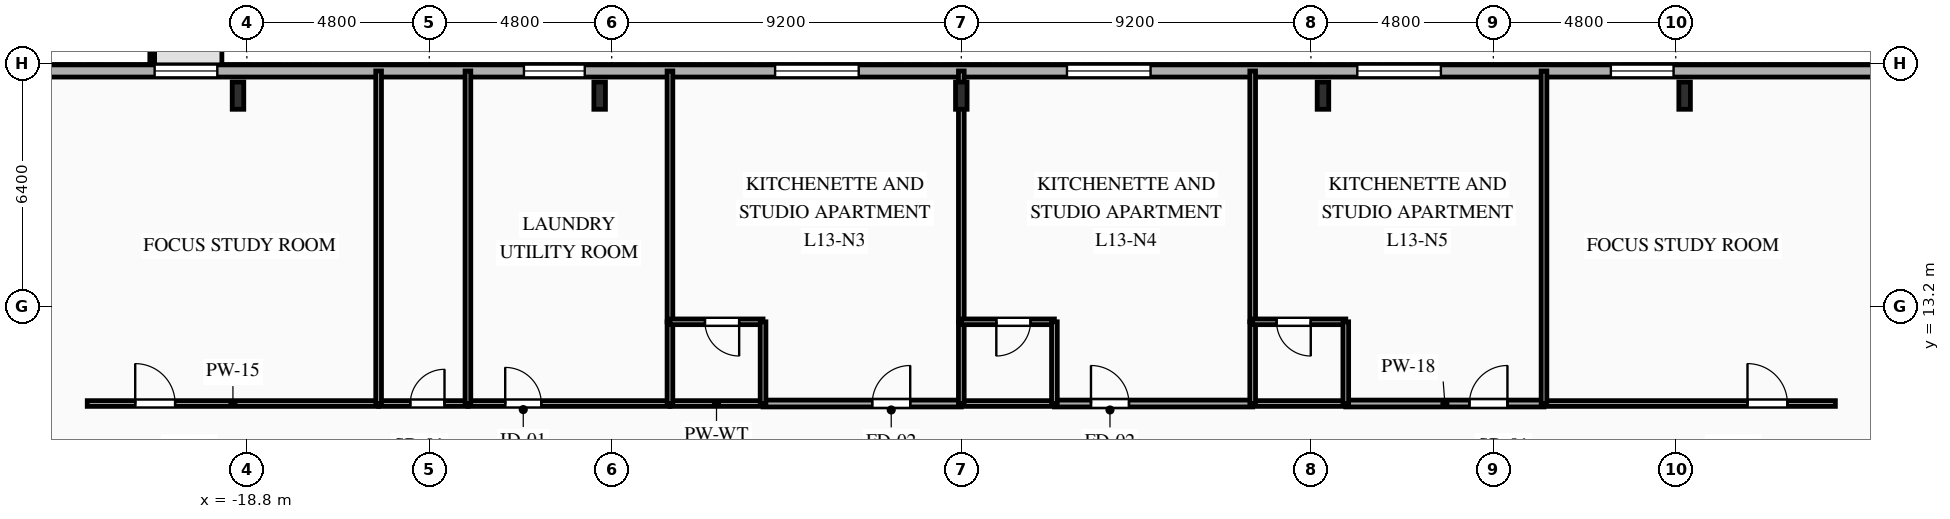
"""IFC4 building model, lengths in metres.
Left out: names, types, materials, properties, quantities, classifications, styles, units other than length and angle.
Written with IfcOpenShell. Run it as: python <this file> out.ifc"""

import sys

from ifc_helpers import new_model, si_unit, direction, frame, frame_2d, origin, origin_2d, place, context, subcontext, project, spatial, rectangle, i_section, extrude, element, fill, save


model = new_model("IFC4")
c1 = context("Model", 3, precision=1e-05, world=origin(), true_north=direction((0.0, 1.0)))
c2 = subcontext(c1, "Body", "Model", "MODEL_VIEW")
j1 = project(units=[si_unit("LENGTHUNIT", "METRE"), si_unit("PLANEANGLEUNIT", "RADIAN")], contexts=[c1])
p1 = place(None, origin())
s1 = spatial("IfcSite", under=j1, at=p1, CompositionType="ELEMENT")
p2 = place(p1, origin())
s2 = spatial("IfcBuilding", under=s1, at=p2, CompositionType="ELEMENT")
p3 = place(p2, frame((0.0, 0.0, 50.45)))
s3 = spatial("IfcBuildingStorey", under=s2, at=p3, CompositionType="ELEMENT", Elevation=50.45)
for number, where, z_axis, x_axis in (
    (1, (19.033, 18.75, 0.0), (0.0, 0.0, 1.0), (1.0, 0.0, 0.0)),
    (2, (9.517, 18.75, 0.0), (0.0, 0.0, 1.0), (1.0, 0.0, 0.0)),
    (3, (0.0, 18.75, 0.0), (0.0, 0.0, 1.0), (1.0, 0.0, 0.0)),
    (4, (-9.517, 18.75, 0.0), (0.0, 0.0, 1.0), (1.0, 0.0, 0.0)),
    (5, (-19.033, 18.75, 0.0), (0.0, 0.0, 1.0), (1.0, 0.0, 0.0)),
):
    element("IfcColumn", number, at=place(p3, frame(where, z_axis=z_axis, x_axis=x_axis)), inside=s3, PredefinedType="COLUMN", context=c2, shape_type="SweptSolid", body=[
        extrude(i_section(OverallWidth=0.304, OverallDepth=0.716, WebThickness=0.021, FlangeThickness=0.04, FilletRadius=0.027, at=origin_2d()), origin(), (0.0, 0.0, 1.0), 3.35),
    ])
p4 = place(p3, frame((-29.2, 19.4, 0.0), z_axis=(0.0, 0.0, 1.0), x_axis=(1.0, 0.0, 0.0)))
e6 = element("IfcWall", 6, at=p4, inside=s3, PredefinedType="SOLIDWALL", context=c2, shape_type="SweptSolid", body=[
    extrude(rectangle(XDim=58.4, YDim=0.32, at=frame_2d((29.2, 0.0))), origin(), (0.0, 0.0, 1.0), 3.035),
])
p5 = place(p4, frame((7.972, 0.0, 0.85)))
e7 = element("IfcOpeningElement", 7, at=p5, cuts=e6, PredefinedType="OPENING", context=c2, shape_type="SweptSolid", body=[
    extrude(rectangle(XDim=1.65, YDim=1.85, at=frame_2d((0.825, 0.925))), frame((0.0, 0.17, 0.0), z_axis=(0.0, -1.0, 0.0), x_axis=(1.0, 0.0, 0.0)), (0.0, 0.0, 1.0), 0.34),
])
p6 = place(p4, frame((17.691, 0.0, 0.85)))
e8 = element("IfcOpeningElement", 8, at=p6, cuts=e6, PredefinedType="OPENING", context=c2, shape_type="SweptSolid", body=[
    extrude(rectangle(XDim=1.6, YDim=1.85, at=frame_2d((0.8, 0.925))), frame((0.0, 0.17, 0.0), z_axis=(0.0, -1.0, 0.0), x_axis=(1.0, 0.0, 0.0)), (0.0, 0.0, 1.0), 0.34),
])
p7 = place(p4, frame((24.3, 0.0, 0.85)))
e9 = element("IfcOpeningElement", 9, at=p7, cuts=e6, PredefinedType="OPENING", context=c2, shape_type="SweptSolid", body=[
    extrude(rectangle(XDim=2.2, YDim=1.85, at=frame_2d((1.1, 0.925))), frame((0.0, 0.17, 0.0), z_axis=(0.0, -1.0, 0.0), x_axis=(1.0, 0.0, 0.0)), (0.0, 0.0, 1.0), 0.34),
])
p8 = place(p4, frame((31.98, 0.0, 0.85)))
e10 = element("IfcOpeningElement", 10, at=p8, cuts=e6, PredefinedType="OPENING", context=c2, shape_type="SweptSolid", body=[
    extrude(rectangle(XDim=2.2, YDim=1.85, at=frame_2d((1.1, 0.925))), frame((0.0, 0.17, 0.0), z_axis=(0.0, -1.0, 0.0), x_axis=(1.0, 0.0, 0.0)), (0.0, 0.0, 1.0), 0.34),
])
p9 = place(p4, frame((39.62, 0.0, 0.85)))
e11 = element("IfcOpeningElement", 11, at=p9, cuts=e6, PredefinedType="OPENING", context=c2, shape_type="SweptSolid", body=[
    extrude(rectangle(XDim=2.2, YDim=1.85, at=frame_2d((1.1, 0.925))), frame((0.0, 0.17, 0.0), z_axis=(0.0, -1.0, 0.0), x_axis=(1.0, 0.0, 0.0)), (0.0, 0.0, 1.0), 0.34),
])
p10 = place(p4, frame((46.292, 0.0, 0.85)))
e12 = element("IfcOpeningElement", 12, at=p10, cuts=e6, PredefinedType="OPENING", context=c2, shape_type="SweptSolid", body=[
    extrude(rectangle(XDim=1.65, YDim=1.85, at=frame_2d((0.825, 0.925))), frame((0.0, 0.17, 0.0), z_axis=(0.0, -1.0, 0.0), x_axis=(1.0, 0.0, 0.0)), (0.0, 0.0, 1.0), 0.34),
])
p11 = place(p3, frame((-23.0, 10.65, 0.0), z_axis=(0.0, 0.0, 1.0), x_axis=(1.0, 0.0, 0.0)))
e13 = element("IfcWall", 13, at=p11, inside=s3, PredefinedType="PARTITIONING", context=c2, shape_type="SweptSolid", body=[
    extrude(rectangle(XDim=7.667, YDim=0.15, at=frame_2d((3.833, 0.0))), origin(), (0.0, 0.0, 1.0), 3.035),
])
p12 = place(p11, frame((1.262, 0.0, 0.0)))
e14 = element("IfcOpeningElement", 14, at=p12, cuts=e13, PredefinedType="OPENING", context=c2, shape_type="SweptSolid", body=[
    extrude(rectangle(XDim=1.05, YDim=2.15, at=frame_2d((0.525, 1.075))), frame((0.0, 0.085, 0.0), z_axis=(0.0, -1.0, 0.0), x_axis=(1.0, 0.0, 0.0)), (0.0, 0.0, 1.0), 0.17),
])
p13 = place(p3, frame((-15.333, 10.65, 0.0), z_axis=(0.0, 0.0, 1.0), x_axis=(1.0, 0.0, 0.0)))
e15 = element("IfcWall", 15, at=p13, inside=s3, PredefinedType="PLUMBINGWALL", context=c2, shape_type="SweptSolid", body=[
    extrude(rectangle(XDim=2.35, YDim=0.15, at=frame_2d((1.175, 0.0))), origin(), (0.0, 0.0, 1.0), 3.035),
])
p14 = place(p13, frame((0.834, 0.0, 0.0)))
e16 = element("IfcOpeningElement", 16, at=p14, cuts=e15, PredefinedType="OPENING", context=c2, shape_type="SweptSolid", body=[
    extrude(rectangle(XDim=0.9, YDim=2.1, at=frame_2d((0.45, 1.05))), frame((0.0, 0.085, 0.0), z_axis=(0.0, -1.0, 0.0), x_axis=(1.0, 0.0, 0.0)), (0.0, 0.0, 1.0), 0.17),
])
p15 = place(p3, frame((-12.983, 10.65, 0.0), z_axis=(0.0, 0.0, 1.0), x_axis=(1.0, 0.0, 0.0)))
e17 = element("IfcWall", 17, at=p15, inside=s3, PredefinedType="PARTITIONING", context=c2, shape_type="SweptSolid", body=[
    extrude(rectangle(XDim=5.316, YDim=0.15, at=frame_2d((2.658, 0.0))), origin(), (0.0, 0.0, 1.0), 3.035),
])
p16 = place(p15, frame((0.981, 0.0, 0.0)))
e18 = element("IfcOpeningElement", 18, at=p16, cuts=e17, PredefinedType="OPENING", context=c2, shape_type="SweptSolid", body=[
    extrude(rectangle(XDim=0.95, YDim=2.1, at=frame_2d((0.475, 1.05))), frame((0.0, 0.085, 0.0), z_axis=(0.0, -1.0, 0.0), x_axis=(1.0, 0.0, 0.0)), (0.0, 0.0, 1.0), 0.17),
])
p17 = place(p3, frame((-5.217, 10.65, 0.0), z_axis=(0.0, 0.0, 1.0), x_axis=(1.0, 0.0, 0.0)))
e19 = element("IfcWall", 19, at=p17, inside=s3, PredefinedType="PARTITIONING", context=c2, shape_type="SweptSolid", body=[
    extrude(rectangle(XDim=5.217, YDim=0.18, at=frame_2d((2.608, 0.0))), origin(), (0.0, 0.0, 1.0), 3.035),
])
p18 = place(p17, frame((2.873, 0.0, 0.0)))
e20 = element("IfcOpeningElement", 20, at=p18, cuts=e19, PredefinedType="OPENING", context=c2, shape_type="SweptSolid", body=[
    extrude(rectangle(XDim=1.0, YDim=2.15, at=frame_2d((0.5, 1.075))), frame((0.0, 0.1, 0.0), z_axis=(0.0, -1.0, 0.0), x_axis=(1.0, 0.0, 0.0)), (0.0, 0.0, 1.0), 0.2),
])
p19 = place(p3, frame((-7.667, 10.65, 0.0), z_axis=(0.0, 0.0, 1.0), x_axis=(1.0, 0.0, 0.0)))
e21 = element("IfcWall", 21, at=p19, inside=s3, PredefinedType="PLUMBINGWALL", context=c2, shape_type="SweptSolid", body=[
    extrude(rectangle(XDim=2.45, YDim=0.15, at=frame_2d((1.225, 0.0))), origin(), (0.0, 0.0, 1.0), 3.035),
])
p20 = place(p3, frame((2.45, 10.65, 0.0), z_axis=(0.0, 0.0, 1.0), x_axis=(1.0, 0.0, 0.0)))
e22 = element("IfcWall", 22, at=p20, inside=s3, PredefinedType="PARTITIONING", context=c2, shape_type="SweptSolid", body=[
    extrude(rectangle(XDim=5.217, YDim=0.18, at=frame_2d((2.608, 0.0))), origin(), (0.0, 0.0, 1.0), 3.035),
])
p21 = place(p20, frame((0.962, 0.0, 0.0)))
e23 = element("IfcOpeningElement", 23, at=p21, cuts=e22, PredefinedType="OPENING", context=c2, shape_type="SweptSolid", body=[
    extrude(rectangle(XDim=1.0, YDim=2.15, at=frame_2d((0.5, 1.075))), frame((0.0, 0.1, 0.0), z_axis=(0.0, -1.0, 0.0), x_axis=(1.0, 0.0, 0.0)), (0.0, 0.0, 1.0), 0.2),
])
p22 = place(p3, frame((0.0, 10.65, 0.0), z_axis=(0.0, 0.0, 1.0), x_axis=(1.0, 0.0, 0.0)))
e24 = element("IfcWall", 24, at=p22, inside=s3, PredefinedType="PLUMBINGWALL", context=c2, shape_type="SweptSolid", body=[
    extrude(rectangle(XDim=2.45, YDim=0.15, at=frame_2d((1.225, 0.0))), origin(), (0.0, 0.0, 1.0), 3.035),
])
p23 = place(p3, frame((10.117, 10.65, 0.0), z_axis=(0.0, 0.0, 1.0), x_axis=(1.0, 0.0, 0.0)))
e25 = element("IfcWall", 25, at=p23, inside=s3, PredefinedType="PARTITIONING", context=c2, shape_type="SweptSolid", body=[
    extrude(rectangle(XDim=5.216, YDim=0.18, at=frame_2d((2.608, 0.0))), origin(), (0.0, 0.0, 1.0), 3.035),
])
p24 = place(p23, frame((3.254, 0.0, 0.0)))
e26 = element("IfcOpeningElement", 26, at=p24, cuts=e25, PredefinedType="OPENING", context=c2, shape_type="SweptSolid", body=[
    extrude(rectangle(XDim=1.0, YDim=2.15, at=frame_2d((0.5, 1.075))), frame((0.0, 0.1, 0.0), z_axis=(0.0, -1.0, 0.0), x_axis=(1.0, 0.0, 0.0)), (0.0, 0.0, 1.0), 0.2),
])
p25 = place(p3, frame((7.667, 10.65, 0.0), z_axis=(0.0, 0.0, 1.0), x_axis=(1.0, 0.0, 0.0)))
e27 = element("IfcWall", 27, at=p25, inside=s3, PredefinedType="PLUMBINGWALL", context=c2, shape_type="SweptSolid", body=[
    extrude(rectangle(XDim=2.45, YDim=0.15, at=frame_2d((1.225, 0.0))), origin(), (0.0, 0.0, 1.0), 3.035),
])
p26 = place(p3, frame((15.333, 10.65, 0.0), z_axis=(0.0, 0.0, 1.0), x_axis=(1.0, 0.0, 0.0)))
e28 = element("IfcWall", 28, at=p26, inside=s3, PredefinedType="PARTITIONING", context=c2, shape_type="SweptSolid", body=[
    extrude(rectangle(XDim=7.667, YDim=0.15, at=frame_2d((3.833, 0.0))), origin(), (0.0, 0.0, 1.0), 3.035),
])
p27 = place(p26, frame((5.355, 0.0, 0.0)))
e29 = element("IfcOpeningElement", 29, at=p27, cuts=e28, PredefinedType="OPENING", context=c2, shape_type="SweptSolid", body=[
    extrude(rectangle(XDim=1.05, YDim=2.15, at=frame_2d((0.525, 1.075))), frame((0.0, 0.085, 0.0), z_axis=(0.0, -1.0, 0.0), x_axis=(1.0, 0.0, 0.0)), (0.0, 0.0, 1.0), 0.17),
])
for number, where, z_axis, x_axis in (
    (30, (-15.333, 19.4, 0.0), (0.0, 0.0, 1.0), (0.0, -1.0, 0.0)),
    (31, (-12.983, 19.4, 0.0), (0.0, 0.0, 1.0), (0.0, -1.0, 0.0)),
):
    element("IfcWall", number, at=place(p3, frame(where, z_axis=z_axis, x_axis=x_axis)), inside=s3, PredefinedType="PLUMBINGWALL", context=c2, shape_type="SweptSolid", body=[
        extrude(rectangle(XDim=8.75, YDim=0.15, at=frame_2d((4.375, 0.0))), origin(), (0.0, 0.0, 1.0), 3.035),
    ])
p28 = place(p3, frame((-7.667, 19.4, 0.0), z_axis=(0.0, 0.0, 1.0), x_axis=(0.0, -1.0, 0.0)))
e32 = element("IfcWall", 32, at=p28, inside=s3, PredefinedType="PARTITIONING", context=c2, shape_type="SweptSolid", body=[
    extrude(rectangle(XDim=6.6, YDim=0.15, at=frame_2d((3.3, 0.0))), origin(), (0.0, 0.0, 1.0), 3.035),
])
p29 = place(p3, frame((-7.667, 12.8, 0.0), z_axis=(0.0, 0.0, 1.0), x_axis=(0.0, -1.0, 0.0)))
e33 = element("IfcWall", 33, at=p29, inside=s3, PredefinedType="PLUMBINGWALL", context=c2, shape_type="SweptSolid", body=[
    extrude(rectangle(XDim=2.15, YDim=0.15, at=frame_2d((1.075, 0.0))), origin(), (0.0, 0.0, 1.0), 3.035),
])
p30 = place(p3, frame((-5.217, 12.8, 0.0), z_axis=(0.0, 0.0, 1.0), x_axis=(-1.0, 0.0, 0.0)))
e34 = element("IfcWall", 34, at=p30, inside=s3, PredefinedType="PLUMBINGWALL", context=c2, shape_type="SweptSolid", body=[
    extrude(rectangle(XDim=2.45, YDim=0.15, at=frame_2d((1.225, 0.0))), origin(), (0.0, 0.0, 1.0), 3.035),
])
p31 = place(p30, frame((0.629, 0.0, 0.0)))
e35 = element("IfcOpeningElement", 35, at=p31, cuts=e34, PredefinedType="OPENING", context=c2, shape_type="SweptSolid", body=[
    extrude(rectangle(XDim=0.9, YDim=2.1, at=frame_2d((0.45, 1.05))), frame((0.0, 0.085, 0.0), z_axis=(0.0, -1.0, 0.0), x_axis=(1.0, 0.0, 0.0)), (0.0, 0.0, 1.0), 0.17),
])
p32 = place(p3, frame((-5.217, 10.65, 0.0), z_axis=(0.0, 0.0, 1.0), x_axis=(0.0, 1.0, 0.0)))
e36 = element("IfcWall", 36, at=p32, inside=s3, PredefinedType="PLUMBINGWALL", context=c2, shape_type="SweptSolid", body=[
    extrude(rectangle(XDim=2.15, YDim=0.15, at=frame_2d((1.075, 0.0))), origin(), (0.0, 0.0, 1.0), 3.035),
])
p33 = place(p3, frame((0.0, 19.4, 0.0), z_axis=(0.0, 0.0, 1.0), x_axis=(0.0, -1.0, 0.0)))
e37 = element("IfcWall", 37, at=p33, inside=s3, PredefinedType="PARTITIONING", context=c2, shape_type="SweptSolid", body=[
    extrude(rectangle(XDim=6.6, YDim=0.15, at=frame_2d((3.3, 0.0))), origin(), (0.0, 0.0, 1.0), 3.035),
])
p34 = place(p3, frame((0.0, 12.8, 0.0), z_axis=(0.0, 0.0, 1.0), x_axis=(0.0, -1.0, 0.0)))
e38 = element("IfcWall", 38, at=p34, inside=s3, PredefinedType="PLUMBINGWALL", context=c2, shape_type="SweptSolid", body=[
    extrude(rectangle(XDim=2.15, YDim=0.15, at=frame_2d((1.075, 0.0))), origin(), (0.0, 0.0, 1.0), 3.035),
])
p35 = place(p3, frame((2.45, 12.8, 0.0), z_axis=(0.0, 0.0, 1.0), x_axis=(-1.0, 0.0, 0.0)))
e39 = element("IfcWall", 39, at=p35, inside=s3, PredefinedType="PLUMBINGWALL", context=c2, shape_type="SweptSolid", body=[
    extrude(rectangle(XDim=2.45, YDim=0.15, at=frame_2d((1.225, 0.0))), origin(), (0.0, 0.0, 1.0), 3.035),
])
p36 = place(p35, frame((0.629, 0.0, 0.0)))
e40 = element("IfcOpeningElement", 40, at=p36, cuts=e39, PredefinedType="OPENING", context=c2, shape_type="SweptSolid", body=[
    extrude(rectangle(XDim=0.9, YDim=2.1, at=frame_2d((0.45, 1.05))), frame((0.0, 0.085, 0.0), z_axis=(0.0, -1.0, 0.0), x_axis=(1.0, 0.0, 0.0)), (0.0, 0.0, 1.0), 0.17),
])
p37 = place(p3, frame((2.45, 10.65, 0.0), z_axis=(0.0, 0.0, 1.0), x_axis=(0.0, 1.0, 0.0)))
e41 = element("IfcWall", 41, at=p37, inside=s3, PredefinedType="PLUMBINGWALL", context=c2, shape_type="SweptSolid", body=[
    extrude(rectangle(XDim=2.15, YDim=0.15, at=frame_2d((1.075, 0.0))), origin(), (0.0, 0.0, 1.0), 3.035),
])
p38 = place(p3, frame((7.667, 19.4, 0.0), z_axis=(0.0, 0.0, 1.0), x_axis=(0.0, -1.0, 0.0)))
e42 = element("IfcWall", 42, at=p38, inside=s3, PredefinedType="PARTITIONING", context=c2, shape_type="SweptSolid", body=[
    extrude(rectangle(XDim=6.6, YDim=0.15, at=frame_2d((3.3, 0.0))), origin(), (0.0, 0.0, 1.0), 3.035),
])
p39 = place(p3, frame((7.667, 12.8, 0.0), z_axis=(0.0, 0.0, 1.0), x_axis=(0.0, -1.0, 0.0)))
e43 = element("IfcWall", 43, at=p39, inside=s3, PredefinedType="PLUMBINGWALL", context=c2, shape_type="SweptSolid", body=[
    extrude(rectangle(XDim=2.15, YDim=0.15, at=frame_2d((1.075, 0.0))), origin(), (0.0, 0.0, 1.0), 3.035),
])
p40 = place(p3, frame((10.117, 12.8, 0.0), z_axis=(0.0, 0.0, 1.0), x_axis=(-1.0, 0.0, 0.0)))
e44 = element("IfcWall", 44, at=p40, inside=s3, PredefinedType="PLUMBINGWALL", context=c2, shape_type="SweptSolid", body=[
    extrude(rectangle(XDim=2.45, YDim=0.15, at=frame_2d((1.225, 0.0))), origin(), (0.0, 0.0, 1.0), 3.035),
])
p41 = place(p40, frame((0.921, 0.0, 0.0)))
e45 = element("IfcOpeningElement", 45, at=p41, cuts=e44, PredefinedType="OPENING", context=c2, shape_type="SweptSolid", body=[
    extrude(rectangle(XDim=0.9, YDim=2.1, at=frame_2d((0.45, 1.05))), frame((0.0, 0.085, 0.0), z_axis=(0.0, -1.0, 0.0), x_axis=(1.0, 0.0, 0.0)), (0.0, 0.0, 1.0), 0.17),
])
p42 = place(p3, frame((10.117, 10.65, 0.0), z_axis=(0.0, 0.0, 1.0), x_axis=(0.0, 1.0, 0.0)))
e46 = element("IfcWall", 46, at=p42, inside=s3, PredefinedType="PLUMBINGWALL", context=c2, shape_type="SweptSolid", body=[
    extrude(rectangle(XDim=2.15, YDim=0.15, at=frame_2d((1.075, 0.0))), origin(), (0.0, 0.0, 1.0), 3.035),
])
p43 = place(p3, frame((15.333, 19.4, 0.0), z_axis=(0.0, 0.0, 1.0), x_axis=(0.0, -1.0, 0.0)))
e47 = element("IfcWall", 47, at=p43, inside=s3, PredefinedType="PARTITIONING", context=c2, shape_type="SweptSolid", body=[
    extrude(rectangle(XDim=8.75, YDim=0.15, at=frame_2d((4.375, 0.0))), origin(), (0.0, 0.0, 1.0), 3.035),
])
p44 = place(p5, origin())
e48 = element("IfcWindow", 48, at=p44, inside=s3, PartitioningType="SINGLE_PANEL", PredefinedType="WINDOW", context=c2, shape_type="SweptSolid", body=[
    extrude(rectangle(XDim=1.65, YDim=1.85, at=frame_2d((0.825, 0.925))), frame((0.0, 0.03, 0.0), z_axis=(0.0, -1.0, 0.0), x_axis=(1.0, 0.0, 0.0)), (0.0, 0.0, 1.0), 0.06),
])
fill(e7, e48)
p45 = place(p6, origin())
e49 = element("IfcWindow", 49, at=p45, inside=s3, PartitioningType="SINGLE_PANEL", PredefinedType="WINDOW", context=c2, shape_type="SweptSolid", body=[
    extrude(rectangle(XDim=1.6, YDim=1.85, at=frame_2d((0.8, 0.925))), frame((0.0, 0.03, 0.0), z_axis=(0.0, -1.0, 0.0), x_axis=(1.0, 0.0, 0.0)), (0.0, 0.0, 1.0), 0.06),
])
fill(e8, e49)
p46 = place(p7, origin())
e50 = element("IfcWindow", 50, at=p46, inside=s3, PartitioningType="SINGLE_PANEL", PredefinedType="WINDOW", context=c2, shape_type="SweptSolid", body=[
    extrude(rectangle(XDim=2.2, YDim=1.85, at=frame_2d((1.1, 0.925))), frame((0.0, 0.03, 0.0), z_axis=(0.0, -1.0, 0.0), x_axis=(1.0, 0.0, 0.0)), (0.0, 0.0, 1.0), 0.06),
])
fill(e9, e50)
p47 = place(p8, origin())
e51 = element("IfcWindow", 51, at=p47, inside=s3, PartitioningType="SINGLE_PANEL", PredefinedType="WINDOW", context=c2, shape_type="SweptSolid", body=[
    extrude(rectangle(XDim=2.2, YDim=1.85, at=frame_2d((1.1, 0.925))), frame((0.0, 0.03, 0.0), z_axis=(0.0, -1.0, 0.0), x_axis=(1.0, 0.0, 0.0)), (0.0, 0.0, 1.0), 0.06),
])
fill(e10, e51)
p48 = place(p9, origin())
e52 = element("IfcWindow", 52, at=p48, inside=s3, PartitioningType="SINGLE_PANEL", PredefinedType="WINDOW", context=c2, shape_type="SweptSolid", body=[
    extrude(rectangle(XDim=2.2, YDim=1.85, at=frame_2d((1.1, 0.925))), frame((0.0, 0.03, 0.0), z_axis=(0.0, -1.0, 0.0), x_axis=(1.0, 0.0, 0.0)), (0.0, 0.0, 1.0), 0.06),
])
fill(e11, e52)
p49 = place(p10, origin())
e53 = element("IfcWindow", 53, at=p49, inside=s3, PartitioningType="SINGLE_PANEL", PredefinedType="WINDOW", context=c2, shape_type="SweptSolid", body=[
    extrude(rectangle(XDim=1.65, YDim=1.85, at=frame_2d((0.825, 0.925))), frame((0.0, 0.03, 0.0), z_axis=(0.0, -1.0, 0.0), x_axis=(1.0, 0.0, 0.0)), (0.0, 0.0, 1.0), 0.06),
])
fill(e12, e53)
p50 = place(p12, origin())
e54 = element("IfcDoor", 54, at=p50, inside=s3, OperationType="SINGLE_SWING_LEFT", PredefinedType="DOOR", context=c2, shape_type="SweptSolid", body=[
    extrude(rectangle(XDim=1.05, YDim=2.15, at=frame_2d((0.525, 1.075))), frame((0.0, 0.025, 0.0), z_axis=(0.0, -1.0, 0.0), x_axis=(1.0, 0.0, 0.0)), (0.0, 0.0, 1.0), 0.05),
])
fill(e14, e54)
p51 = place(p14, origin())
e55 = element("IfcDoor", 55, at=p51, inside=s3, OperationType="SINGLE_SWING_RIGHT", PredefinedType="DOOR", context=c2, shape_type="SweptSolid", body=[
    extrude(rectangle(XDim=0.9, YDim=2.1, at=frame_2d((0.45, 1.05))), frame((0.0, 0.025, 0.0), z_axis=(0.0, -1.0, 0.0), x_axis=(1.0, 0.0, 0.0)), (0.0, 0.0, 1.0), 0.05),
])
fill(e16, e55)
p52 = place(p16, origin())
e56 = element("IfcDoor", 56, at=p52, inside=s3, OperationType="SINGLE_SWING_LEFT", PredefinedType="DOOR", context=c2, shape_type="SweptSolid", body=[
    extrude(rectangle(XDim=0.95, YDim=2.1, at=frame_2d((0.475, 1.05))), frame((0.0, 0.025, 0.0), z_axis=(0.0, -1.0, 0.0), x_axis=(1.0, 0.0, 0.0)), (0.0, 0.0, 1.0), 0.05),
])
fill(e18, e56)
p53 = place(p18, origin())
e57 = element("IfcDoor", 57, at=p53, inside=s3, OperationType="SINGLE_SWING_RIGHT", PredefinedType="DOOR", context=c2, shape_type="SweptSolid", body=[
    extrude(rectangle(XDim=1.0, YDim=2.15, at=frame_2d((0.5, 1.075))), frame((0.0, 0.025, 0.0), z_axis=(0.0, -1.0, 0.0), x_axis=(1.0, 0.0, 0.0)), (0.0, 0.0, 1.0), 0.05),
])
fill(e20, e57)
p54 = place(p21, origin())
e58 = element("IfcDoor", 58, at=p54, inside=s3, OperationType="SINGLE_SWING_LEFT", PredefinedType="DOOR", context=c2, shape_type="SweptSolid", body=[
    extrude(rectangle(XDim=1.0, YDim=2.15, at=frame_2d((0.5, 1.075))), frame((0.0, 0.025, 0.0), z_axis=(0.0, -1.0, 0.0), x_axis=(1.0, 0.0, 0.0)), (0.0, 0.0, 1.0), 0.05),
])
fill(e23, e58)
p55 = place(p24, origin())
e59 = element("IfcDoor", 59, at=p55, inside=s3, OperationType="SINGLE_SWING_RIGHT", PredefinedType="DOOR", context=c2, shape_type="SweptSolid", body=[
    extrude(rectangle(XDim=1.0, YDim=2.15, at=frame_2d((0.5, 1.075))), frame((0.0, 0.025, 0.0), z_axis=(0.0, -1.0, 0.0), x_axis=(1.0, 0.0, 0.0)), (0.0, 0.0, 1.0), 0.05),
])
fill(e26, e59)
p56 = place(p27, origin())
e60 = element("IfcDoor", 60, at=p56, inside=s3, OperationType="SINGLE_SWING_LEFT", PredefinedType="DOOR", context=c2, shape_type="SweptSolid", body=[
    extrude(rectangle(XDim=1.05, YDim=2.15, at=frame_2d((0.525, 1.075))), frame((0.0, 0.025, 0.0), z_axis=(0.0, -1.0, 0.0), x_axis=(1.0, 0.0, 0.0)), (0.0, 0.0, 1.0), 0.05),
])
fill(e29, e60)
p57 = place(p31, origin())
e61 = element("IfcDoor", 61, at=p57, inside=s3, OperationType="SINGLE_SWING_LEFT", PredefinedType="DOOR", context=c2, shape_type="SweptSolid", body=[
    extrude(rectangle(XDim=0.9, YDim=2.1, at=frame_2d((0.45, 1.05))), frame((0.0, 0.025, 0.0), z_axis=(0.0, -1.0, 0.0), x_axis=(1.0, 0.0, 0.0)), (0.0, 0.0, 1.0), 0.05),
])
fill(e35, e61)
p58 = place(p36, origin())
e62 = element("IfcDoor", 62, at=p58, inside=s3, OperationType="SINGLE_SWING_RIGHT", PredefinedType="DOOR", context=c2, shape_type="SweptSolid", body=[
    extrude(rectangle(XDim=0.9, YDim=2.1, at=frame_2d((0.45, 1.05))), frame((0.0, 0.025, 0.0), z_axis=(0.0, -1.0, 0.0), x_axis=(1.0, 0.0, 0.0)), (0.0, 0.0, 1.0), 0.05),
])
fill(e40, e62)
p59 = place(p41, origin())
e63 = element("IfcDoor", 63, at=p59, inside=s3, OperationType="SINGLE_SWING_LEFT", PredefinedType="DOOR", context=c2, shape_type="SweptSolid", body=[
    extrude(rectangle(XDim=0.9, YDim=2.1, at=frame_2d((0.45, 1.05))), frame((0.0, 0.025, 0.0), z_axis=(0.0, -1.0, 0.0), x_axis=(1.0, 0.0, 0.0)), (0.0, 0.0, 1.0), 0.05),
])
fill(e45, e63)
save(model, sys.argv[1])
